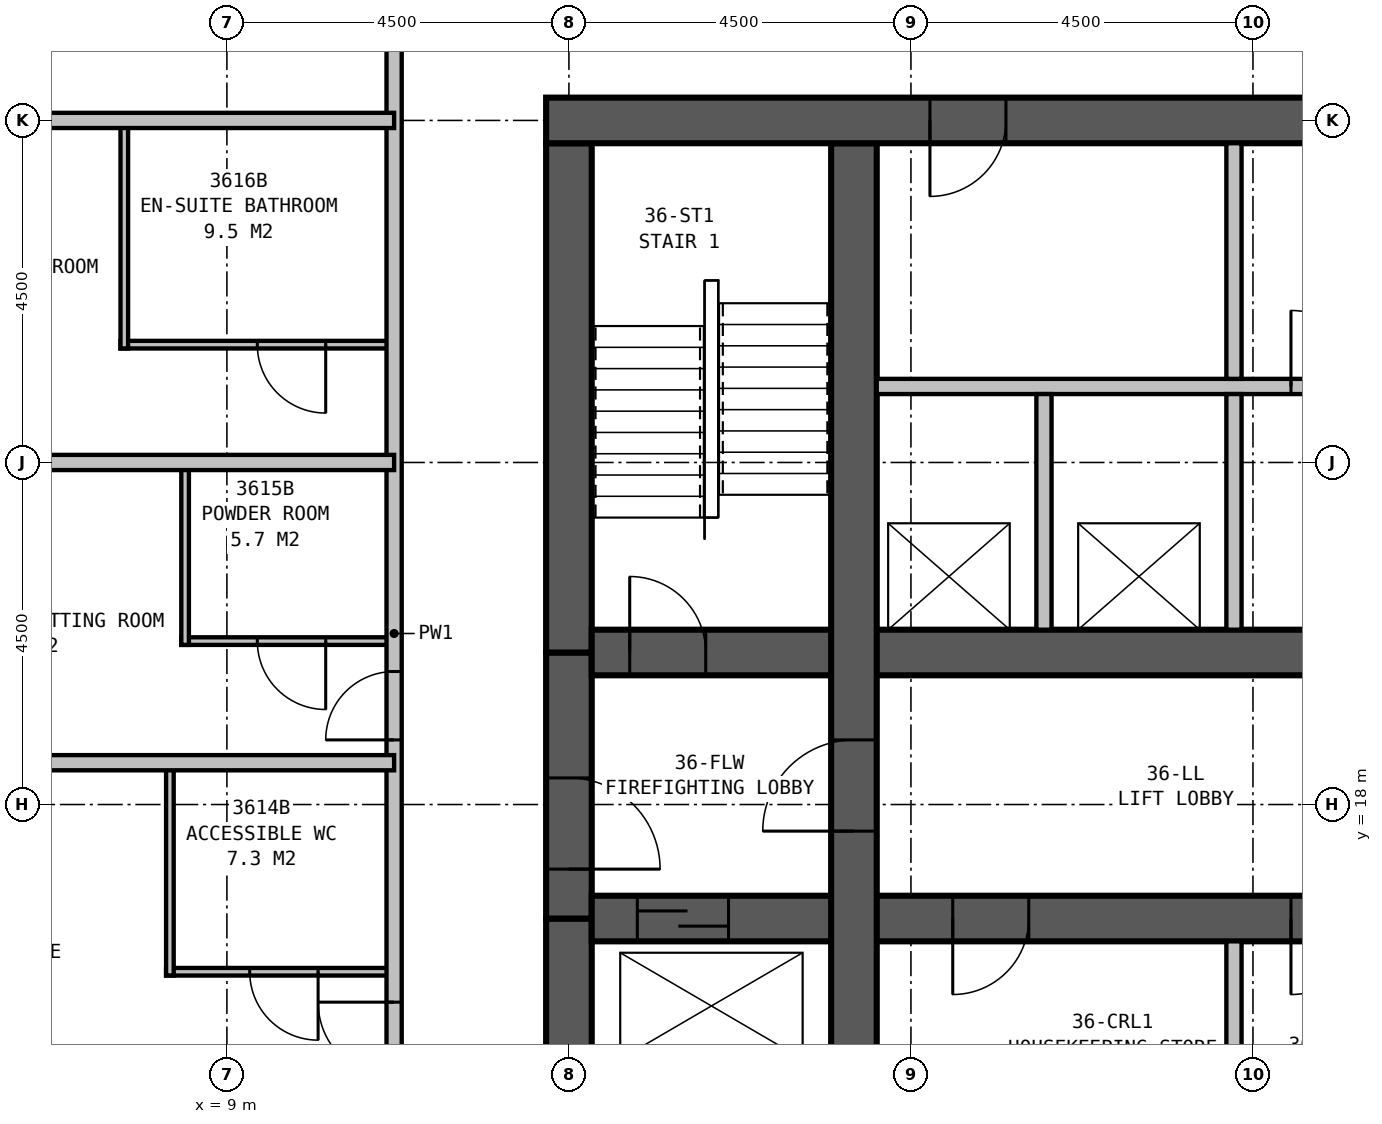
"""IFC4 building model, lengths in metres.
Left out: names, types, materials, properties, quantities, classifications, styles, units other than length and angle.
Written with IfcOpenShell. Run it as: python <this file> out.ifc"""

import sys

from ifc_helpers import new_model, si_unit, direction, frame, frame_2d, origin, place, context, subcontext, project, spatial, rectangle, extrude, element, fill, save


model = new_model("IFC4")
c1 = context("Model", 3, precision=1e-05, world=origin(), true_north=direction((0.0, 1.0)))
c2 = subcontext(c1, "Body", "Model", "MODEL_VIEW")
j1 = project(units=[si_unit("LENGTHUNIT", "METRE"), si_unit("PLANEANGLEUNIT", "RADIAN")], contexts=[c1])
p1 = place(None, origin())
s1 = spatial("IfcSite", under=j1, at=p1, CompositionType="ELEMENT")
p2 = place(p1, origin())
s2 = spatial("IfcBuilding", under=s1, at=p2, CompositionType="ELEMENT")
p3 = place(p2, frame((0.0, 0.0, 138.9)))
s3 = spatial("IfcBuildingStorey", under=s2, at=p3, CompositionType="ELEMENT", Elevation=138.9)
p4 = place(p3, frame((36.3, 27.0, 0.0), z_axis=(0.0, 0.0, 1.0), x_axis=(-1.0, 0.0, 0.0)))
e1 = element("IfcWall", 1, at=p4, inside=s3, PredefinedType="SHEAR", context=c2, shape_type="SweptSolid", body=[
    extrude(rectangle(XDim=23.1, YDim=0.6, at=frame_2d((11.55, 0.0))), origin(), (0.0, 0.0, 1.0), 3.5),
])
p5 = place(p4, frame((17.05, 0.0, 0.0)))
e2 = element("IfcOpeningElement", 2, at=p5, cuts=e1, PredefinedType="OPENING", context=c2, shape_type="SweptSolid", body=[
    extrude(rectangle(XDim=1.0, YDim=2.1, at=frame_2d((0.5, 1.05))), frame((0.0, 0.31, 0.0), z_axis=(0.0, -1.0, 0.0), x_axis=(1.0, 0.0, 0.0)), (0.0, 0.0, 1.0), 0.62),
])
p6 = place(p4, frame((12.05, 0.0, 0.0)))
e3 = element("IfcOpeningElement", 3, at=p6, cuts=e1, PredefinedType="OPENING", context=c2, shape_type="SweptSolid", body=[
    extrude(rectangle(XDim=1.0, YDim=2.1, at=frame_2d((0.5, 1.05))), frame((0.0, 0.31, 0.0), z_axis=(0.0, -1.0, 0.0), x_axis=(1.0, 0.0, 0.0)), (0.0, 0.0, 1.0), 0.62),
])
p7 = place(p4, frame((7.05, 0.0, 0.0)))
e4 = element("IfcOpeningElement", 4, at=p7, cuts=e1, PredefinedType="OPENING", context=c2, shape_type="SweptSolid", body=[
    extrude(rectangle(XDim=1.0, YDim=2.1, at=frame_2d((0.5, 1.05))), frame((0.0, 0.31, 0.0), z_axis=(0.0, -1.0, 0.0), x_axis=(1.0, 0.0, 0.0)), (0.0, 0.0, 1.0), 0.62),
])
p8 = place(p3, frame((17.25, 13.8, 0.0), z_axis=(0.0, 0.0, 1.0), x_axis=(0.0, 1.0, 0.0)))
e5 = element("IfcWall", 5, at=p8, inside=s3, PredefinedType="SHEAR", context=c2, shape_type="SweptSolid", body=[
    extrude(rectangle(XDim=12.9, YDim=0.6, at=frame_2d((6.45, 0.0))), origin(), (0.0, 0.0, 1.0), 3.5),
])
p9 = place(p8, frame((3.85, 0.0, 0.0)))
e6 = element("IfcOpeningElement", 6, at=p9, cuts=e5, PredefinedType="OPENING", context=c2, shape_type="SweptSolid", body=[
    extrude(rectangle(XDim=1.2, YDim=2.1, at=frame_2d((0.6, 1.05))), frame((0.0, 0.31, 0.0), z_axis=(0.0, -1.0, 0.0), x_axis=(1.0, 0.0, 0.0)), (0.0, 0.0, 1.0), 0.62),
])
p10 = place(p3, frame((13.8, 16.5, 0.0), z_axis=(0.0, 0.0, 1.0), x_axis=(1.0, 0.0, 0.0)))
e7 = element("IfcWall", 7, at=p10, inside=s3, PredefinedType="SHEAR", context=c2, shape_type="SweptSolid", body=[
    extrude(rectangle(XDim=21.9, YDim=0.6, at=frame_2d((10.95, 0.0))), origin(), (0.0, 0.0, 1.0), 3.5),
])
p11 = place(p10, frame((11.65, 0.0, 0.0)))
e8 = element("IfcOpeningElement", 8, at=p11, cuts=e7, PredefinedType="OPENING", context=c2, shape_type="SweptSolid", body=[
    extrude(rectangle(XDim=1.1, YDim=2.1, at=frame_2d((0.55, 1.05))), frame((0.0, 0.31, 0.0), z_axis=(0.0, -1.0, 0.0), x_axis=(1.0, 0.0, 0.0)), (0.0, 0.0, 1.0), 0.62),
])
p12 = place(p10, frame((14.15, 0.0, 0.0)))
e9 = element("IfcOpeningElement", 9, at=p12, cuts=e7, PredefinedType="OPENING", context=c2, shape_type="SweptSolid", body=[
    extrude(rectangle(XDim=1.1, YDim=2.1, at=frame_2d((0.55, 1.05))), frame((0.0, 0.31, 0.0), z_axis=(0.0, -1.0, 0.0), x_axis=(1.0, 0.0, 0.0)), (0.0, 0.0, 1.0), 0.62),
])
p13 = place(p10, frame((16.65, 0.0, 0.0)))
e10 = element("IfcOpeningElement", 10, at=p13, cuts=e7, PredefinedType="OPENING", context=c2, shape_type="SweptSolid", body=[
    extrude(rectangle(XDim=1.1, YDim=2.1, at=frame_2d((0.55, 1.05))), frame((0.0, 0.31, 0.0), z_axis=(0.0, -1.0, 0.0), x_axis=(1.0, 0.0, 0.0)), (0.0, 0.0, 1.0), 0.62),
])
p14 = place(p10, frame((5.75, 0.0, 0.0), z_axis=(0.0, 0.0, 1.0), x_axis=(-1.0, 0.0, 0.0)))
e11 = element("IfcOpeningElement", 11, at=p14, cuts=e7, PredefinedType="OPENING", context=c2, shape_type="SweptSolid", body=[
    extrude(rectangle(XDim=1.0, YDim=2.1, at=frame_2d((0.5, 1.05))), frame((0.0, 0.31, 0.0), z_axis=(0.0, -1.0, 0.0), x_axis=(1.0, 0.0, 0.0)), (0.0, 0.0, 1.0), 0.62),
])
p15 = place(p10, frame((10.2, 0.0, 0.0), z_axis=(0.0, 0.0, 1.0), x_axis=(-1.0, 0.0, 0.0)))
e12 = element("IfcOpeningElement", 12, at=p15, cuts=e7, PredefinedType="OPENING", context=c2, shape_type="SweptSolid", body=[
    extrude(rectangle(XDim=1.0, YDim=2.1, at=frame_2d((0.5, 1.05))), frame((0.0, 0.31, 0.0), z_axis=(0.0, -1.0, 0.0), x_axis=(1.0, 0.0, 0.0)), (0.0, 0.0, 1.0), 0.62),
])
p16 = place(p10, frame((0.6, 0.0, 0.0)))
e13 = element("IfcOpeningElement", 13, at=p16, cuts=e7, PredefinedType="OPENING", context=c2, shape_type="SweptSolid", body=[
    extrude(rectangle(XDim=1.2, YDim=2.1, at=frame_2d((0.6, 1.05))), frame((0.0, 0.31, 0.0), z_axis=(0.0, -1.0, 0.0), x_axis=(1.0, 0.0, 0.0)), (0.0, 0.0, 1.0), 0.62),
])
p17 = place(p10, frame((19.6, 0.0, 0.0)))
e14 = element("IfcOpeningElement", 14, at=p17, cuts=e7, PredefinedType="OPENING", context=c2, shape_type="SweptSolid", body=[
    extrude(rectangle(XDim=1.2, YDim=2.1, at=frame_2d((0.6, 1.05))), frame((0.0, 0.31, 0.0), z_axis=(0.0, -1.0, 0.0), x_axis=(1.0, 0.0, 0.0)), (0.0, 0.0, 1.0), 0.62),
])
p18 = place(p3, frame((13.8, 20.0, 0.0), z_axis=(0.0, 0.0, 1.0), x_axis=(1.0, 0.0, 0.0)))
e15 = element("IfcWall", 15, at=p18, inside=s3, PredefinedType="SHEAR", context=c2, shape_type="SweptSolid", body=[
    extrude(rectangle(XDim=21.9, YDim=0.6, at=frame_2d((10.95, 0.0))), origin(), (0.0, 0.0, 1.0), 3.5),
])
p19 = place(p18, frame((0.5, 0.0, 0.0)))
e16 = element("IfcOpeningElement", 16, at=p19, cuts=e15, PredefinedType="OPENING", context=c2, shape_type="SweptSolid", body=[
    extrude(rectangle(XDim=1.0, YDim=2.1, at=frame_2d((0.5, 1.05))), frame((0.0, 0.31, 0.0), z_axis=(0.0, -1.0, 0.0), x_axis=(1.0, 0.0, 0.0)), (0.0, 0.0, 1.0), 0.62),
])
p20 = place(p18, frame((20.5, 0.0, 0.0)))
e17 = element("IfcOpeningElement", 17, at=p20, cuts=e15, PredefinedType="OPENING", context=c2, shape_type="SweptSolid", body=[
    extrude(rectangle(XDim=1.0, YDim=2.1, at=frame_2d((0.5, 1.05))), frame((0.0, 0.31, 0.0), z_axis=(0.0, -1.0, 0.0), x_axis=(1.0, 0.0, 0.0)), (0.0, 0.0, 1.0), 0.62),
])
p21 = place(p18, frame((16.65, 0.0, 0.0)))
e18 = element("IfcOpeningElement", 18, at=p21, cuts=e15, PredefinedType="OPENING", context=c2, shape_type="SweptSolid", body=[
    extrude(rectangle(XDim=1.1, YDim=2.1, at=frame_2d((0.55, 1.05))), frame((0.0, 0.31, 0.0), z_axis=(0.0, -1.0, 0.0), x_axis=(1.0, 0.0, 0.0)), (0.0, 0.0, 1.0), 0.62),
])
p22 = place(p3, frame((13.5, 26.7, 0.0), z_axis=(0.0, 0.0, 1.0), x_axis=(0.0, -1.0, 0.0)))
e19 = element("IfcWall", 19, at=p22, inside=s3, PredefinedType="SHEAR", context=c2, shape_type="SweptSolid", body=[
    extrude(rectangle(XDim=6.7, YDim=0.6, at=frame_2d((3.35, 0.0))), origin(), (0.0, 0.0, 1.0), 3.5),
])
p23 = place(p3, frame((13.5, 20.0, 0.0), z_axis=(0.0, 0.0, 1.0), x_axis=(0.0, -1.0, 0.0)))
e20 = element("IfcWall", 20, at=p23, inside=s3, PredefinedType="SHEAR", context=c2, shape_type="SweptSolid", body=[
    extrude(rectangle(XDim=3.5, YDim=0.6, at=frame_2d((1.75, 0.0))), origin(), (0.0, 0.0, 1.0), 3.5),
])
p24 = place(p23, frame((1.65, 0.0, 0.0)))
e21 = element("IfcOpeningElement", 21, at=p24, cuts=e20, PredefinedType="OPENING", context=c2, shape_type="SweptSolid", body=[
    extrude(rectangle(XDim=1.2, YDim=2.1, at=frame_2d((0.6, 1.05))), frame((0.0, 0.31, 0.0), z_axis=(0.0, -1.0, 0.0), x_axis=(1.0, 0.0, 0.0)), (0.0, 0.0, 1.0), 0.62),
])
p25 = place(p3, frame((13.5, 16.5, 0.0), z_axis=(0.0, 0.0, 1.0), x_axis=(0.0, -1.0, 0.0)))
e22 = element("IfcWall", 22, at=p25, inside=s3, PredefinedType="SHEAR", context=c2, shape_type="SweptSolid", body=[
    extrude(rectangle(XDim=2.7, YDim=0.6, at=frame_2d((1.35, 0.0))), origin(), (0.0, 0.0, 1.0), 3.5),
])
p26 = place(p3, frame((11.2, 11.2, 0.0), z_axis=(0.0, 0.0, 1.0), x_axis=(0.0, 1.0, 0.0)))
e23 = element("IfcWall", 23, at=p26, inside=s3, PredefinedType="PARTITIONING", context=c2, shape_type="SweptSolid", body=[
    extrude(rectangle(XDim=18.1, YDim=0.2, at=frame_2d((9.05, 0.0))), origin(), (0.0, 0.0, 1.0), 3.25),
])
p27 = place(p26, frame((3.2, 0.0, 0.0)))
e24 = element("IfcOpeningElement", 24, at=p27, cuts=e23, PredefinedType="OPENING", context=c2, shape_type="SweptSolid", body=[
    extrude(rectangle(XDim=1.0, YDim=2.1, at=frame_2d((0.5, 1.05))), frame((0.0, 0.11, 0.0), z_axis=(0.0, -1.0, 0.0), x_axis=(1.0, 0.0, 0.0)), (0.0, 0.0, 1.0), 0.22),
])
p28 = place(p26, frame((7.65, 0.0, 0.0)))
e25 = element("IfcOpeningElement", 25, at=p28, cuts=e23, PredefinedType="OPENING", context=c2, shape_type="SweptSolid", body=[
    extrude(rectangle(XDim=0.9, YDim=2.1, at=frame_2d((0.45, 1.05))), frame((0.0, 0.11, 0.0), z_axis=(0.0, -1.0, 0.0), x_axis=(1.0, 0.0, 0.0)), (0.0, 0.0, 1.0), 0.22),
])
p29 = place(p3, frame((11.2, 18.55, 0.0), z_axis=(0.0, 0.0, 1.0), x_axis=(-1.0, 0.0, 0.0)))
e26 = element("IfcWall", 26, at=p29, inside=s3, PredefinedType="PARTITIONING", context=c2, shape_type="SweptSolid", body=[
    extrude(rectangle(XDim=9.138, YDim=0.2, at=frame_2d((4.569, 0.0))), origin(), (0.0, 0.0, 1.0), 3.25),
])
p30 = place(p3, frame((11.2, 22.5, 0.0), z_axis=(0.0, 0.0, 1.0), x_axis=(-1.0, 0.0, 0.0)))
e27 = element("IfcWall", 27, at=p30, inside=s3, PredefinedType="PARTITIONING", context=c2, shape_type="SweptSolid", body=[
    extrude(rectangle(XDim=8.699, YDim=0.2, at=frame_2d((4.35, 0.0))), origin(), (0.0, 0.0, 1.0), 2.25),
])
p31 = place(p30, frame((7.1, 0.0, 0.0), z_axis=(0.0, 0.0, 1.0), x_axis=(-1.0, 0.0, 0.0)))
e28 = element("IfcOpeningElement", 28, at=p31, cuts=e27, PredefinedType="OPENING", context=c2, shape_type="SweptSolid", body=[
    extrude(rectangle(XDim=0.9, YDim=2.1, at=frame_2d((0.45, 1.05))), frame((0.0, 0.11, 0.0), z_axis=(0.0, -1.0, 0.0), x_axis=(1.0, 0.0, 0.0)), (0.0, 0.0, 1.0), 0.22),
])
p32 = place(p3, frame((8.25, 15.75, 0.0), z_axis=(0.0, 0.0, 1.0), x_axis=(0.0, 1.0, 0.0)))
e29 = element("IfcWall", 29, at=p32, inside=s3, PredefinedType="PLUMBINGWALL", context=c2, shape_type="SweptSolid", body=[
    extrude(rectangle(XDim=2.8, YDim=0.1, at=frame_2d((1.4, 0.0))), origin(), (0.0, 0.0, 1.0), 3.25),
])
p33 = place(p3, frame((11.2, 15.8, 0.0), z_axis=(0.0, 0.0, 1.0), x_axis=(-1.0, 0.0, 0.0)))
e30 = element("IfcWall", 30, at=p33, inside=s3, PredefinedType="PLUMBINGWALL", context=c2, shape_type="SweptSolid", body=[
    extrude(rectangle(XDim=3.0, YDim=0.1, at=frame_2d((1.5, 0.0))), origin(), (0.0, 0.0, 1.0), 3.25),
])
p34 = place(p33, frame((1.0, 0.0, 0.0)))
e31 = element("IfcOpeningElement", 31, at=p34, cuts=e30, PredefinedType="OPENING", context=c2, shape_type="SweptSolid", body=[
    extrude(rectangle(XDim=0.9, YDim=2.1, at=frame_2d((0.45, 1.05))), frame((0.0, 0.06, 0.0), z_axis=(0.0, -1.0, 0.0), x_axis=(1.0, 0.0, 0.0)), (0.0, 0.0, 1.0), 0.12),
])
p35 = place(p3, frame((8.45, 20.1, 0.0), z_axis=(0.0, 0.0, 1.0), x_axis=(0.0, 1.0, 0.0)))
e32 = element("IfcWall", 32, at=p35, inside=s3, PredefinedType="PLUMBINGWALL", context=c2, shape_type="SweptSolid", body=[
    extrude(rectangle(XDim=2.4, YDim=0.1, at=frame_2d((1.2, 0.0))), origin(), (0.0, 0.0, 1.0), 3.25),
])
p36 = place(p3, frame((11.2, 20.15, 0.0), z_axis=(0.0, 0.0, 1.0), x_axis=(-1.0, 0.0, 0.0)))
e33 = element("IfcWall", 33, at=p36, inside=s3, PredefinedType="PLUMBINGWALL", context=c2, shape_type="SweptSolid", body=[
    extrude(rectangle(XDim=2.8, YDim=0.1, at=frame_2d((1.4, 0.0))), origin(), (0.0, 0.0, 1.0), 3.25),
])
p37 = place(p36, frame((0.9, 0.0, 0.0)))
e34 = element("IfcOpeningElement", 34, at=p37, cuts=e33, PredefinedType="OPENING", context=c2, shape_type="SweptSolid", body=[
    extrude(rectangle(XDim=0.9, YDim=2.1, at=frame_2d((0.45, 1.05))), frame((0.0, 0.06, 0.0), z_axis=(0.0, -1.0, 0.0), x_axis=(1.0, 0.0, 0.0)), (0.0, 0.0, 1.0), 0.12),
])
p38 = place(p3, frame((7.65, 24.0, 0.0), z_axis=(0.0, 0.0, 1.0), x_axis=(0.0, 1.0, 0.0)))
e35 = element("IfcWall", 35, at=p38, inside=s3, PredefinedType="PLUMBINGWALL", context=c2, shape_type="SweptSolid", body=[
    extrude(rectangle(XDim=3.0, YDim=0.1, at=frame_2d((1.5, 0.0))), origin(), (0.0, 0.0, 1.0), 3.25),
])
p39 = place(p3, frame((11.2, 24.05, 0.0), z_axis=(0.0, 0.0, 1.0), x_axis=(-1.0, 0.0, 0.0)))
e36 = element("IfcWall", 36, at=p39, inside=s3, PredefinedType="PLUMBINGWALL", context=c2, shape_type="SweptSolid", body=[
    extrude(rectangle(XDim=3.6, YDim=0.1, at=frame_2d((1.8, 0.0))), origin(), (0.0, 0.0, 1.0), 3.25),
])
p40 = place(p39, frame((0.9, 0.0, 0.0)))
e37 = element("IfcOpeningElement", 37, at=p40, cuts=e36, PredefinedType="OPENING", context=c2, shape_type="SweptSolid", body=[
    extrude(rectangle(XDim=0.9, YDim=2.1, at=frame_2d((0.45, 1.05))), frame((0.0, 0.06, 0.0), z_axis=(0.0, -1.0, 0.0), x_axis=(1.0, 0.0, 0.0)), (0.0, 0.0, 1.0), 0.12),
])
p41 = place(p3, frame((11.2, 27.0, 0.0), z_axis=(0.0, 0.0, 1.0), x_axis=(-1.0, 0.0, 0.0)))
e38 = element("IfcWall", 38, at=p41, inside=s3, PredefinedType="PARTITIONING", context=c2, shape_type="SweptSolid", body=[
    extrude(rectangle(XDim=7.977, YDim=0.2, at=frame_2d((3.988, 0.0))), origin(), (0.0, 0.0, 1.0), 1.95),
])
p42 = place(p3, frame((19.75, 20.3, 0.0), z_axis=(0.0, 0.0, 1.0), x_axis=(0.0, 1.0, 0.0)))
e39 = element("IfcWall", 39, at=p42, inside=s3, PredefinedType="PARTITIONING", context=c2, shape_type="SweptSolid", body=[
    extrude(rectangle(XDim=3.1, YDim=0.2, at=frame_2d((1.55, 0.0))), origin(), (0.0, 0.0, 1.0), 3.25),
])
p43 = place(p3, frame((22.25, 13.8, 0.0), z_axis=(0.0, 0.0, 1.0), x_axis=(0.0, 1.0, 0.0)))
e40 = element("IfcWall", 40, at=p43, inside=s3, PredefinedType="PARTITIONING", context=c2, shape_type="SweptSolid", body=[
    extrude(rectangle(XDim=2.4, YDim=0.2, at=frame_2d((1.2, 0.0))), origin(), (0.0, 0.0, 1.0), 3.25),
])
p44 = place(p3, frame((22.25, 20.3, 0.0), z_axis=(0.0, 0.0, 1.0), x_axis=(0.0, 1.0, 0.0)))
e41 = element("IfcWall", 41, at=p44, inside=s3, PredefinedType="PARTITIONING", context=c2, shape_type="SweptSolid", body=[
    extrude(rectangle(XDim=3.1, YDim=0.2, at=frame_2d((1.55, 0.0))), origin(), (0.0, 0.0, 1.0), 3.25),
])
p45 = place(p3, frame((17.55, 23.5, 0.0), z_axis=(0.0, 0.0, 1.0), x_axis=(1.0, 0.0, 0.0)))
e42 = element("IfcWall", 42, at=p45, inside=s3, PredefinedType="PARTITIONING", context=c2, shape_type="SweptSolid", body=[
    extrude(rectangle(XDim=14.4, YDim=0.2, at=frame_2d((7.2, 0.0))), origin(), (0.0, 0.0, 1.0), 3.25),
])
p46 = place(p45, frame((5.45, 0.0, 0.0)))
e43 = element("IfcOpeningElement", 43, at=p46, cuts=e42, PredefinedType="OPENING", context=c2, shape_type="SweptSolid", body=[
    extrude(rectangle(XDim=1.0, YDim=2.1, at=frame_2d((0.5, 1.05))), frame((0.0, 0.11, 0.0), z_axis=(0.0, -1.0, 0.0), x_axis=(1.0, 0.0, 0.0)), (0.0, 0.0, 1.0), 0.22),
])
p47 = place(p3, frame((22.25, 23.6, 0.0), z_axis=(0.0, 0.0, 1.0), x_axis=(0.0, 1.0, 0.0)))
e44 = element("IfcWall", 44, at=p47, inside=s3, PredefinedType="PARTITIONING", context=c2, shape_type="SweptSolid", body=[
    extrude(rectangle(XDim=3.1, YDim=0.2, at=frame_2d((1.55, 0.0))), origin(), (0.0, 0.0, 1.0), 3.25),
])
p48 = place(p27, origin())
e45 = element("IfcDoor", 45, at=p48, inside=s3, OperationType="SINGLE_SWING_RIGHT", PredefinedType="DOOR", context=c2, shape_type="SweptSolid", body=[
    extrude(rectangle(XDim=1.0, YDim=2.1, at=frame_2d((0.5, 1.05))), frame((0.0, 0.025, 0.0), z_axis=(0.0, -1.0, 0.0), x_axis=(1.0, 0.0, 0.0)), (0.0, 0.0, 1.0), 0.05),
])
fill(e24, e45)
p49 = place(p28, origin())
e46 = element("IfcDoor", 46, at=p49, inside=s3, OperationType="SINGLE_SWING_LEFT", PredefinedType="DOOR", context=c2, shape_type="SweptSolid", body=[
    extrude(rectangle(XDim=0.9, YDim=2.1, at=frame_2d((0.45, 1.05))), frame((0.0, 0.025, 0.0), z_axis=(0.0, -1.0, 0.0), x_axis=(1.0, 0.0, 0.0)), (0.0, 0.0, 1.0), 0.05),
])
fill(e25, e46)
p50 = place(p34, origin())
e47 = element("IfcDoor", 47, at=p50, inside=s3, OperationType="SINGLE_SWING_LEFT", PredefinedType="DOOR", context=c2, shape_type="SweptSolid", body=[
    extrude(rectangle(XDim=0.9, YDim=2.1, at=frame_2d((0.45, 1.05))), frame((0.0, 0.025, 0.0), z_axis=(0.0, -1.0, 0.0), x_axis=(1.0, 0.0, 0.0)), (0.0, 0.0, 1.0), 0.05),
])
fill(e31, e47)
p51 = place(p37, origin())
e48 = element("IfcDoor", 48, at=p51, inside=s3, OperationType="SINGLE_SWING_LEFT", PredefinedType="DOOR", context=c2, shape_type="SweptSolid", body=[
    extrude(rectangle(XDim=0.9, YDim=2.1, at=frame_2d((0.45, 1.05))), frame((0.0, 0.025, 0.0), z_axis=(0.0, -1.0, 0.0), x_axis=(1.0, 0.0, 0.0)), (0.0, 0.0, 1.0), 0.05),
])
fill(e34, e48)
p52 = place(p40, origin())
e49 = element("IfcDoor", 49, at=p52, inside=s3, OperationType="SINGLE_SWING_LEFT", PredefinedType="DOOR", context=c2, shape_type="SweptSolid", body=[
    extrude(rectangle(XDim=0.9, YDim=2.1, at=frame_2d((0.45, 1.05))), frame((0.0, 0.025, 0.0), z_axis=(0.0, -1.0, 0.0), x_axis=(1.0, 0.0, 0.0)), (0.0, 0.0, 1.0), 0.05),
])
fill(e37, e49)
p53 = place(p46, origin())
e50 = element("IfcDoor", 50, at=p53, inside=s3, OperationType="SINGLE_SWING_LEFT", PredefinedType="DOOR", context=c2, shape_type="SweptSolid", body=[
    extrude(rectangle(XDim=1.0, YDim=2.1, at=frame_2d((0.5, 1.05))), frame((0.0, 0.025, 0.0), z_axis=(0.0, -1.0, 0.0), x_axis=(1.0, 0.0, 0.0)), (0.0, 0.0, 1.0), 0.05),
])
fill(e43, e50)
p54 = place(p24, origin())
e51 = element("IfcDoor", 51, at=p54, inside=s3, OperationType="SINGLE_SWING_RIGHT", PredefinedType="DOOR", context=c2, shape_type="SweptSolid", body=[
    extrude(rectangle(XDim=1.2, YDim=2.1, at=frame_2d((0.6, 1.05))), frame((0.0, 0.3, 0.0), z_axis=(0.0, -1.0, 0.0), x_axis=(1.0, 0.0, 0.0)), (0.0, 0.0, 1.0), 0.6),
])
fill(e21, e51)
p55 = place(p9, origin())
e52 = element("IfcDoor", 52, at=p55, inside=s3, OperationType="SINGLE_SWING_LEFT", PredefinedType="DOOR", context=c2, shape_type="SweptSolid", body=[
    extrude(rectangle(XDim=1.2, YDim=2.1, at=frame_2d((0.6, 1.05))), frame((0.0, 0.3, 0.0), z_axis=(0.0, -1.0, 0.0), x_axis=(1.0, 0.0, 0.0)), (0.0, 0.0, 1.0), 0.6),
])
fill(e6, e52)
p56 = place(p19, origin())
e53 = element("IfcDoor", 53, at=p56, inside=s3, OperationType="SINGLE_SWING_LEFT", PredefinedType="DOOR", context=c2, shape_type="SweptSolid", body=[
    extrude(rectangle(XDim=1.0, YDim=2.1, at=frame_2d((0.5, 1.05))), frame((0.0, 0.3, 0.0), z_axis=(0.0, -1.0, 0.0), x_axis=(1.0, 0.0, 0.0)), (0.0, 0.0, 1.0), 0.6),
])
fill(e16, e53)
p57 = place(p14, origin())
e54 = element("IfcDoor", 54, at=p57, inside=s3, OperationType="SINGLE_SWING_RIGHT", PredefinedType="DOOR", context=c2, shape_type="SweptSolid", body=[
    extrude(rectangle(XDim=1.0, YDim=2.1, at=frame_2d((0.5, 1.05))), frame((0.0, 0.3, 0.0), z_axis=(0.0, -1.0, 0.0), x_axis=(1.0, 0.0, 0.0)), (0.0, 0.0, 1.0), 0.6),
])
fill(e11, e54)
p58 = place(p15, origin())
e55 = element("IfcDoor", 55, at=p58, inside=s3, OperationType="SINGLE_SWING_RIGHT", PredefinedType="DOOR", context=c2, shape_type="SweptSolid", body=[
    extrude(rectangle(XDim=1.0, YDim=2.1, at=frame_2d((0.5, 1.05))), frame((0.0, 0.3, 0.0), z_axis=(0.0, -1.0, 0.0), x_axis=(1.0, 0.0, 0.0)), (0.0, 0.0, 1.0), 0.6),
])
fill(e12, e55)
p59 = place(p16, origin())
e56 = element("IfcDoor", 56, at=p59, inside=s3, OperationType="SLIDING_TO_LEFT", PredefinedType="DOOR", context=c2, shape_type="SweptSolid", body=[
    extrude(rectangle(XDim=1.2, YDim=2.1, at=frame_2d((0.6, 1.05))), frame((0.0, 0.3, 0.0), z_axis=(0.0, -1.0, 0.0), x_axis=(1.0, 0.0, 0.0)), (0.0, 0.0, 1.0), 0.6),
])
fill(e13, e56)
p60 = place(p5, origin())
e57 = element("IfcDoor", 57, at=p60, inside=s3, OperationType="SINGLE_SWING_RIGHT", PredefinedType="DOOR", context=c2, shape_type="SweptSolid", body=[
    extrude(rectangle(XDim=1.0, YDim=2.1, at=frame_2d((0.5, 1.05))), frame((0.0, 0.3, 0.0), z_axis=(0.0, -1.0, 0.0), x_axis=(1.0, 0.0, 0.0)), (0.0, 0.0, 1.0), 0.6),
])
fill(e2, e57)
save(model, sys.argv[1])
